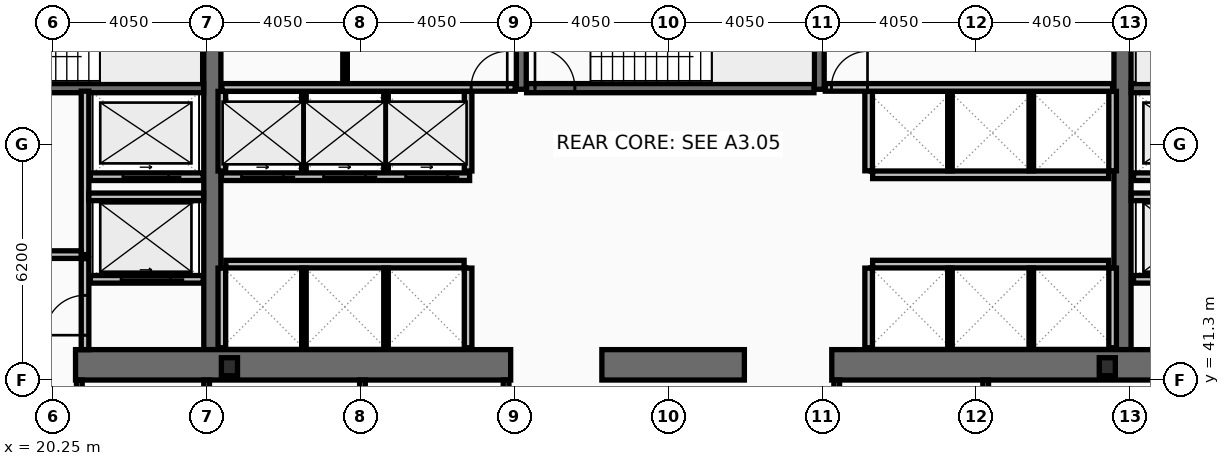
"""IFC4 building model, lengths in metres.
Left out: names, types, materials, properties, quantities, classifications, styles, units other than length and angle.
Written with IfcOpenShell. Run it as: python <this file> out.ifc"""

import sys

from ifc_helpers import new_model, si_unit, direction, frame, frame_2d, origin, origin_2d, place, context, subcontext, project, spatial, rectangle, i_section, extrude, element, fill, save


model = new_model("IFC4")
c1 = context("Model", 3, precision=1e-05, world=origin(), true_north=direction((0.0, 1.0)))
c2 = subcontext(c1, "Body", "Model", "MODEL_VIEW")
j1 = project(units=[si_unit("LENGTHUNIT", "METRE"), si_unit("PLANEANGLEUNIT", "RADIAN")], contexts=[c1])
p1 = place(None, origin())
s1 = spatial("IfcSite", under=j1, at=p1, CompositionType="ELEMENT")
p2 = place(p1, origin())
s2 = spatial("IfcBuilding", under=s1, at=p2, CompositionType="ELEMENT")
p3 = place(p2, frame((0.0, 0.0, 33.8)))
s3 = spatial("IfcBuildingStorey", under=s2, at=p3, CompositionType="ELEMENT", Elevation=33.8)
for number, where, z_axis, x_axis in (
    (1, (24.45, 42.1, 0.0), (0.0, 0.0, 1.0), (0.0, 1.0, 0.0)),
    (2, (48.4, 42.1, 0.0), (0.0, 0.0, 1.0), (0.0, 1.0, 0.0)),
):
    element("IfcWall", number, at=place(p3, frame(where, z_axis=z_axis, x_axis=x_axis)), inside=s3, PredefinedType="SHEAR", context=c2, shape_type="SweptSolid", body=[
        extrude(rectangle(XDim=10.8, YDim=0.45, at=frame_2d((5.4, 0.0))), origin(), (0.0, 0.0, 1.0), 3.82),
    ])
p4 = place(p3, frame((32.3, 41.7, 0.0), z_axis=(0.0, 0.0, 1.0), x_axis=(-1.0, 0.0, 0.0)))
e3 = element("IfcWall", 3, at=p4, inside=s3, PredefinedType="SHEAR", context=c2, shape_type="SweptSolid", body=[
    extrude(rectangle(XDim=11.45, YDim=0.8, at=frame_2d((5.725, 0.0))), origin(), (0.0, 0.0, 1.0), 3.82),
])
p5 = place(p3, frame((38.45, 41.7, 0.0), z_axis=(0.0, 0.0, 1.0), x_axis=(-1.0, 0.0, 0.0)))
e4 = element("IfcWall", 4, at=p5, inside=s3, PredefinedType="SHEAR", context=c2, shape_type="SweptSolid", body=[
    extrude(rectangle(XDim=3.75, YDim=0.8, at=frame_2d((1.875, 0.0))), origin(), (0.0, 0.0, 1.0), 3.82),
])
p6 = place(p3, frame((52.05, 41.7, 0.0), z_axis=(0.0, 0.0, 1.0), x_axis=(-1.0, 0.0, 0.0)))
e5 = element("IfcWall", 5, at=p6, inside=s3, PredefinedType="SHEAR", context=c2, shape_type="SweptSolid", body=[
    extrude(rectangle(XDim=11.3, YDim=0.8, at=frame_2d((5.65, 0.0))), origin(), (0.0, 0.0, 1.0), 3.82),
])
for number, where, z_axis, x_axis in (
    (6, (32.58, 48.95, 0.0), (0.0, 0.0, 1.0), (0.0, 1.0, 0.0)),
    (7, (40.42, 48.95, 0.0), (0.0, 0.0, 1.0), (0.0, 1.0, 0.0)),
):
    element("IfcWall", number, at=place(p3, frame(where, z_axis=z_axis, x_axis=x_axis)), inside=s3, PredefinedType="SHEAR", context=c2, shape_type="SweptSolid", body=[
        extrude(rectangle(XDim=3.95, YDim=0.26, at=frame_2d((1.975, 0.0))), origin(), (0.0, 0.0, 1.0), 3.82),
    ])
p7 = place(p3, frame((17.0, 48.98, 0.0), z_axis=(0.0, 0.0, 1.0), x_axis=(1.0, 0.0, 0.0)))
e8 = element("IfcWall", 8, at=p7, inside=s3, PredefinedType="SHEAR", context=c2, shape_type="SweptSolid", body=[
    extrude(rectangle(XDim=7.22, YDim=0.24, at=frame_2d((3.61, 0.0))), origin(), (0.0, 0.0, 1.0), 3.82),
])
p8 = place(p7, frame((0.22, 0.0, 0.0)))
e9 = element("IfcOpeningElement", 9, at=p8, cuts=e8, PredefinedType="OPENING", context=c2, shape_type="SweptSolid", body=[
    extrude(rectangle(XDim=1.05, YDim=2.15, at=frame_2d((0.525, 1.075))), frame((0.0, 0.13, 0.0), z_axis=(0.0, -1.0, 0.0), x_axis=(1.0, 0.0, 0.0)), (0.0, 0.0, 1.0), 0.26),
])
p9 = place(p3, frame((48.63, 48.98, 0.0), z_axis=(0.0, 0.0, 1.0), x_axis=(1.0, 0.0, 0.0)))
e10 = element("IfcWall", 10, at=p9, inside=s3, PredefinedType="SHEAR", context=c2, shape_type="SweptSolid", body=[
    extrude(rectangle(XDim=7.27, YDim=0.24, at=frame_2d((3.635, 0.0))), origin(), (0.0, 0.0, 1.0), 3.82),
])
p10 = place(p9, frame((6.0, 0.0, 0.0)))
e11 = element("IfcOpeningElement", 11, at=p10, cuts=e10, PredefinedType="OPENING", context=c2, shape_type="SweptSolid", body=[
    extrude(rectangle(XDim=1.05, YDim=2.15, at=frame_2d((0.525, 1.075))), frame((0.0, 0.13, 0.0), z_axis=(0.0, -1.0, 0.0), x_axis=(1.0, 0.0, 0.0)), (0.0, 0.0, 1.0), 0.26),
])
p11 = place(p3, frame((32.72, 48.98, 0.0), z_axis=(0.0, 0.0, 1.0), x_axis=(1.0, 0.0, 0.0)))
e12 = element("IfcWall", 12, at=p11, inside=s3, PredefinedType="SHEAR", context=c2, shape_type="SweptSolid", body=[
    extrude(rectangle(XDim=7.56, YDim=0.24, at=frame_2d((3.78, 0.0))), origin(), (0.0, 0.0, 1.0), 3.82),
])
p12 = place(p11, frame((0.22, 0.0, 0.0)))
e13 = element("IfcOpeningElement", 13, at=p12, cuts=e12, PredefinedType="OPENING", context=c2, shape_type="SweptSolid", body=[
    extrude(rectangle(XDim=1.05, YDim=2.15, at=frame_2d((0.525, 1.075))), frame((0.0, 0.13, 0.0), z_axis=(0.0, -1.0, 0.0), x_axis=(1.0, 0.0, 0.0)), (0.0, 0.0, 1.0), 0.26),
])
for number, where, z_axis, x_axis in (
    (14, (24.9, 41.65, 0.0), (0.0, 0.0, 1.0), (1.0, 0.0, 0.0)),
    (15, (48.0, 41.65, 0.0), (0.0, 0.0, 1.0), (1.0, 0.0, 0.0)),
):
    element("IfcColumn", number, at=place(p3, frame(where, z_axis=z_axis, x_axis=x_axis)), inside=s3, PredefinedType="COLUMN", context=c2, shape_type="SweptSolid", body=[
        extrude(i_section(OverallWidth=0.424, OverallDepth=0.474, WebThickness=0.048, FlangeThickness=0.077, at=origin_2d()), origin(), (0.0, 0.0, 1.0), 4.0),
    ])
p13 = place(p3, frame((51.61, 43.95, 0.0), z_axis=(0.0, 0.0, 1.0), x_axis=(-1.0, 0.0, 0.0)))
e16 = element("IfcWall", 16, at=p13, inside=s3, PredefinedType="PARTITIONING", context=c2, shape_type="SweptSolid", body=[
    extrude(rectangle(XDim=2.92, YDim=0.2, at=frame_2d((1.46, 0.0))), origin(), (0.0, 0.0, 1.0), 3.82),
])
p14 = place(p13, frame((0.81, 0.0, 0.0)))
e17 = element("IfcOpeningElement", 17, at=p14, cuts=e16, PredefinedType="OPENING", context=c2, shape_type="SweptSolid", body=[
    extrude(rectangle(XDim=1.3, YDim=2.18, at=frame_2d((0.65, 1.09))), frame((0.0, 0.11, 0.0), z_axis=(0.0, -1.0, 0.0), x_axis=(1.0, 0.0, 0.0)), (0.0, 0.0, 1.0), 0.22),
])
p15 = place(p3, frame((24.21, 43.95, 0.0), z_axis=(0.0, 0.0, 1.0), x_axis=(-1.0, 0.0, 0.0)))
e18 = element("IfcWall", 18, at=p15, inside=s3, PredefinedType="PARTITIONING", context=c2, shape_type="SweptSolid", body=[
    extrude(rectangle(XDim=2.97, YDim=0.2, at=frame_2d((1.485, 0.0))), origin(), (0.0, 0.0, 1.0), 3.82),
])
p16 = place(p15, frame((0.86, 0.0, 0.0)))
e19 = element("IfcOpeningElement", 19, at=p16, cuts=e18, PredefinedType="OPENING", context=c2, shape_type="SweptSolid", body=[
    extrude(rectangle(XDim=1.3, YDim=2.18, at=frame_2d((0.65, 1.09))), frame((0.0, 0.11, 0.0), z_axis=(0.0, -1.0, 0.0), x_axis=(1.0, 0.0, 0.0)), (0.0, 0.0, 1.0), 0.22),
])
p17 = place(p3, frame((51.61, 46.65, 0.0), z_axis=(0.0, 0.0, 1.0), x_axis=(-1.0, 0.0, 0.0)))
e20 = element("IfcWall", 20, at=p17, inside=s3, PredefinedType="PARTITIONING", context=c2, shape_type="SweptSolid", body=[
    extrude(rectangle(XDim=2.92, YDim=0.2, at=frame_2d((1.46, 0.0))), origin(), (0.0, 0.0, 1.0), 3.82),
])
p18 = place(p17, frame((0.86, 0.0, 0.0)))
e21 = element("IfcOpeningElement", 21, at=p18, cuts=e20, PredefinedType="OPENING", context=c2, shape_type="SweptSolid", body=[
    extrude(rectangle(XDim=1.2, YDim=2.18, at=frame_2d((0.6, 1.09))), frame((0.0, 0.11, 0.0), z_axis=(0.0, -1.0, 0.0), x_axis=(1.0, 0.0, 0.0)), (0.0, 0.0, 1.0), 0.22),
])
p19 = place(p3, frame((24.21, 46.65, 0.0), z_axis=(0.0, 0.0, 1.0), x_axis=(-1.0, 0.0, 0.0)))
e22 = element("IfcWall", 22, at=p19, inside=s3, PredefinedType="PARTITIONING", context=c2, shape_type="SweptSolid", body=[
    extrude(rectangle(XDim=2.97, YDim=0.2, at=frame_2d((1.485, 0.0))), origin(), (0.0, 0.0, 1.0), 3.82),
])
p20 = place(p19, frame((0.91, 0.0, 0.0)))
e23 = element("IfcOpeningElement", 23, at=p20, cuts=e22, PredefinedType="OPENING", context=c2, shape_type="SweptSolid", body=[
    extrude(rectangle(XDim=1.2, YDim=2.18, at=frame_2d((0.6, 1.09))), frame((0.0, 0.11, 0.0), z_axis=(0.0, -1.0, 0.0), x_axis=(1.0, 0.0, 0.0)), (0.0, 0.0, 1.0), 0.22),
])
p21 = place(p3, frame((31.22, 46.65, 0.0), z_axis=(0.0, 0.0, 1.0), x_axis=(-1.0, 0.0, 0.0)))
e24 = element("IfcWall", 24, at=p21, inside=s3, PredefinedType="PARTITIONING", context=c2, shape_type="SweptSolid", body=[
    extrude(rectangle(XDim=6.53, YDim=0.2, at=frame_2d((3.265, 0.0))), origin(), (0.0, 0.0, 1.0), 3.82),
])
p22 = place(p21, frame((4.9, 0.0, 0.0)))
e25 = element("IfcOpeningElement", 25, at=p22, cuts=e24, PredefinedType="OPENING", context=c2, shape_type="SweptSolid", body=[
    extrude(rectangle(XDim=1.1, YDim=2.18, at=frame_2d((0.55, 1.09))), frame((0.0, 0.11, 0.0), z_axis=(0.0, -1.0, 0.0), x_axis=(1.0, 0.0, 0.0)), (0.0, 0.0, 1.0), 0.22),
])
p23 = place(p21, frame((2.74, 0.0, 0.0)))
e26 = element("IfcOpeningElement", 26, at=p23, cuts=e24, PredefinedType="OPENING", context=c2, shape_type="SweptSolid", body=[
    extrude(rectangle(XDim=1.1, YDim=2.18, at=frame_2d((0.55, 1.09))), frame((0.0, 0.11, 0.0), z_axis=(0.0, -1.0, 0.0), x_axis=(1.0, 0.0, 0.0)), (0.0, 0.0, 1.0), 0.22),
])
p24 = place(p21, frame((0.58, 0.0, 0.0)))
e27 = element("IfcOpeningElement", 27, at=p24, cuts=e24, PredefinedType="OPENING", context=c2, shape_type="SweptSolid", body=[
    extrude(rectangle(XDim=1.1, YDim=2.18, at=frame_2d((0.55, 1.09))), frame((0.0, 0.11, 0.0), z_axis=(0.0, -1.0, 0.0), x_axis=(1.0, 0.0, 0.0)), (0.0, 0.0, 1.0), 0.22),
])
p25 = place(p3, frame((21.1, 44.6, 0.0), z_axis=(0.0, 0.0, 1.0), x_axis=(0.0, 1.0, 0.0)))
e28 = element("IfcWall", 28, at=p25, inside=s3, PredefinedType="PARTITIONING", context=c2, shape_type="SweptSolid", body=[
    extrude(rectangle(XDim=4.3, YDim=0.2, at=frame_2d((2.15, 0.0))), origin(), (0.0, 0.0, 1.0), 3.82),
])
p26 = place(p3, frame((17.0, 44.6, 0.0), z_axis=(0.0, 0.0, 1.0), x_axis=(1.0, 0.0, 0.0)))
e29 = element("IfcWall", 29, at=p26, inside=s3, PredefinedType="PARTITIONING", context=c2, shape_type="SweptSolid", body=[
    extrude(rectangle(XDim=4.0, YDim=0.2, at=frame_2d((2.0, 0.0))), origin(), (0.0, 0.0, 1.0), 3.82),
])
p27 = place(p26, frame((1.25, 0.0, 0.0)))
e30 = element("IfcOpeningElement", 30, at=p27, cuts=e29, PredefinedType="OPENING", context=c2, shape_type="SweptSolid", body=[
    extrude(rectangle(XDim=1.05, YDim=2.15, at=frame_2d((0.525, 1.075))), frame((0.0, 0.11, 0.0), z_axis=(0.0, -1.0, 0.0), x_axis=(1.0, 0.0, 0.0)), (0.0, 0.0, 1.0), 0.22),
])
p28 = place(p3, frame((21.2, 46.12, 0.0), z_axis=(0.0, 0.0, 1.0), x_axis=(1.0, 0.0, 0.0)))
e31 = element("IfcWall", 31, at=p28, inside=s3, PredefinedType="PARTITIONING", context=c2, shape_type="SweptSolid", body=[
    extrude(rectangle(XDim=3.02, YDim=0.2, at=frame_2d((1.51, 0.0))), origin(), (0.0, 0.0, 1.0), 3.82),
])
p29 = place(p3, frame((21.1, 42.1, 0.0), z_axis=(0.0, 0.0, 1.0), x_axis=(0.0, 1.0, 0.0)))
e32 = element("IfcWall", 32, at=p29, inside=s3, PredefinedType="PARTITIONING", context=c2, shape_type="SweptSolid", body=[
    extrude(rectangle(XDim=2.395, YDim=0.2, at=frame_2d((1.198, 0.0))), origin(), (0.0, 0.0, 1.0), 3.82),
])
p30 = place(p29, frame((0.38, 0.0, 0.0)))
e33 = element("IfcOpeningElement", 33, at=p30, cuts=e32, PredefinedType="OPENING", context=c2, shape_type="SweptSolid", body=[
    extrude(rectangle(XDim=1.05, YDim=2.15, at=frame_2d((0.525, 1.075))), frame((0.0, 0.11, 0.0), z_axis=(0.0, -1.0, 0.0), x_axis=(1.0, 0.0, 0.0)), (0.0, 0.0, 1.0), 0.22),
])
p31 = place(p3, frame((48.63, 46.12, 0.0), z_axis=(0.0, 0.0, 1.0), x_axis=(1.0, 0.0, 0.0)))
e34 = element("IfcWall", 34, at=p31, inside=s3, PredefinedType="PARTITIONING", context=c2, shape_type="SweptSolid", body=[
    extrude(rectangle(XDim=3.07, YDim=0.2, at=frame_2d((1.535, 0.0))), origin(), (0.0, 0.0, 1.0), 3.82),
])
for number, where, z_axis, x_axis in (
    (35, (24.7, 46.8, 0.0), (0.0, 0.0, 1.0), (0.0, 1.0, 0.0)),
    (36, (31.18, 46.8, 0.0), (0.0, 0.0, 1.0), (0.0, 1.0, 0.0)),
):
    element("IfcWall", number, at=place(p3, frame(where, z_axis=z_axis, x_axis=x_axis)), inside=s3, PredefinedType="PARTITIONING", context=c2, shape_type="SweptSolid", body=[
        extrude(rectangle(XDim=2.095, YDim=0.2, at=frame_2d((1.047, 0.0))), origin(), (0.0, 0.0, 1.0), 3.82),
    ])
for number, where, z_axis, x_axis in (
    (37, (26.86, 46.8, 0.0), (0.0, 0.0, 1.0), (0.0, 1.0, 0.0)),
    (38, (29.02, 46.8, 0.0), (0.0, 0.0, 1.0), (0.0, 1.0, 0.0)),
):
    element("IfcWall", number, at=place(p3, frame(where, z_axis=z_axis, x_axis=x_axis)), inside=s3, PredefinedType="PARTITIONING", context=c2, shape_type="SweptSolid", body=[
        extrude(rectangle(XDim=2.095, YDim=0.12, at=frame_2d((1.047, 0.0))), origin(), (0.0, 0.0, 1.0), 3.82),
    ])
p32 = place(p3, frame((24.805, 44.35, 0.0), z_axis=(0.0, 0.0, 1.0), x_axis=(1.0, 0.0, 0.0)))
e39 = element("IfcWall", 39, at=p32, inside=s3, PredefinedType="PARTITIONING", context=c2, shape_type="SweptSolid", body=[
    extrude(rectangle(XDim=6.27, YDim=0.2, at=frame_2d((3.135, 0.0))), origin(), (0.0, 0.0, 1.0), 3.82),
])
for number, where, z_axis, x_axis in (
    (40, (24.7, 42.15, 0.0), (0.0, 0.0, 1.0), (0.0, 1.0, 0.0)),
    (41, (31.18, 42.15, 0.0), (0.0, 0.0, 1.0), (0.0, 1.0, 0.0)),
):
    element("IfcWall", number, at=place(p3, frame(where, z_axis=z_axis, x_axis=x_axis)), inside=s3, PredefinedType="PARTITIONING", context=c2, shape_type="SweptSolid", body=[
        extrude(rectangle(XDim=2.095, YDim=0.2, at=frame_2d((1.048, 0.0))), origin(), (0.0, 0.0, 1.0), 3.82),
    ])
for number, where, z_axis, x_axis in (
    (42, (26.86, 42.15, 0.0), (0.0, 0.0, 1.0), (0.0, 1.0, 0.0)),
    (43, (29.02, 42.15, 0.0), (0.0, 0.0, 1.0), (0.0, 1.0, 0.0)),
):
    element("IfcWall", number, at=place(p3, frame(where, z_axis=z_axis, x_axis=x_axis)), inside=s3, PredefinedType="PARTITIONING", context=c2, shape_type="SweptSolid", body=[
        extrude(rectangle(XDim=2.095, YDim=0.12, at=frame_2d((1.048, 0.0))), origin(), (0.0, 0.0, 1.0), 3.82),
    ])
p33 = place(p3, frame((41.825, 46.7, 0.0), z_axis=(0.0, 0.0, 1.0), x_axis=(1.0, 0.0, 0.0)))
e44 = element("IfcWall", 44, at=p33, inside=s3, PredefinedType="PARTITIONING", context=c2, shape_type="SweptSolid", body=[
    extrude(rectangle(XDim=6.21, YDim=0.2, at=frame_2d((3.105, 0.0))), origin(), (0.0, 0.0, 1.0), 3.82),
])
for number, where, z_axis, x_axis in (
    (45, (41.72, 46.805, 0.0), (0.0, 0.0, 1.0), (0.0, 1.0, 0.0)),
    (46, (48.14, 46.805, 0.0), (0.0, 0.0, 1.0), (0.0, 1.0, 0.0)),
):
    element("IfcWall", number, at=place(p3, frame(where, z_axis=z_axis, x_axis=x_axis)), inside=s3, PredefinedType="PARTITIONING", context=c2, shape_type="SweptSolid", body=[
        extrude(rectangle(XDim=2.09, YDim=0.2, at=frame_2d((1.045, 0.0))), origin(), (0.0, 0.0, 1.0), 3.82),
    ])
for number, where, z_axis, x_axis in (
    (47, (43.86, 46.805, 0.0), (0.0, 0.0, 1.0), (0.0, 1.0, 0.0)),
    (48, (46.0, 46.805, 0.0), (0.0, 0.0, 1.0), (0.0, 1.0, 0.0)),
):
    element("IfcWall", number, at=place(p3, frame(where, z_axis=z_axis, x_axis=x_axis)), inside=s3, PredefinedType="PARTITIONING", context=c2, shape_type="SweptSolid", body=[
        extrude(rectangle(XDim=2.09, YDim=0.12, at=frame_2d((1.045, 0.0))), origin(), (0.0, 0.0, 1.0), 3.82),
    ])
p34 = place(p3, frame((41.825, 44.35, 0.0), z_axis=(0.0, 0.0, 1.0), x_axis=(1.0, 0.0, 0.0)))
e49 = element("IfcWall", 49, at=p34, inside=s3, PredefinedType="PARTITIONING", context=c2, shape_type="SweptSolid", body=[
    extrude(rectangle(XDim=6.21, YDim=0.2, at=frame_2d((3.105, 0.0))), origin(), (0.0, 0.0, 1.0), 3.82),
])
for number, where, z_axis, x_axis in (
    (50, (41.72, 42.15, 0.0), (0.0, 0.0, 1.0), (0.0, 1.0, 0.0)),
    (51, (48.14, 42.15, 0.0), (0.0, 0.0, 1.0), (0.0, 1.0, 0.0)),
):
    element("IfcWall", number, at=place(p3, frame(where, z_axis=z_axis, x_axis=x_axis)), inside=s3, PredefinedType="PARTITIONING", context=c2, shape_type="SweptSolid", body=[
        extrude(rectangle(XDim=2.095, YDim=0.2, at=frame_2d((1.048, 0.0))), origin(), (0.0, 0.0, 1.0), 3.82),
    ])
for number, where, z_axis, x_axis in (
    (52, (43.86, 42.15, 0.0), (0.0, 0.0, 1.0), (0.0, 1.0, 0.0)),
    (53, (46.0, 42.15, 0.0), (0.0, 0.0, 1.0), (0.0, 1.0, 0.0)),
):
    element("IfcWall", number, at=place(p3, frame(where, z_axis=z_axis, x_axis=x_axis)), inside=s3, PredefinedType="PARTITIONING", context=c2, shape_type="SweptSolid", body=[
        extrude(rectangle(XDim=2.095, YDim=0.12, at=frame_2d((1.048, 0.0))), origin(), (0.0, 0.0, 1.0), 3.82),
    ])
p35 = place(p3, frame((24.7, 49.0, 0.0), z_axis=(0.0, 0.0, 1.0), x_axis=(1.0, 0.0, 0.0)))
e54 = element("IfcWall", 54, at=p35, inside=s3, PredefinedType="PARTITIONING", context=c2, shape_type="SweptSolid", body=[
    extrude(rectangle(XDim=7.72, YDim=0.2, at=frame_2d((3.86, 0.0))), origin(), (0.0, 0.0, 1.0), 3.82),
])
p36 = place(p35, frame((6.56, 0.0, 0.0)))
e55 = element("IfcOpeningElement", 55, at=p36, cuts=e54, PredefinedType="OPENING", context=c2, shape_type="SweptSolid", body=[
    extrude(rectangle(XDim=0.95, YDim=2.1, at=frame_2d((0.475, 1.05))), frame((0.0, 0.11, 0.0), z_axis=(0.0, -1.0, 0.0), x_axis=(1.0, 0.0, 0.0)), (0.0, 0.0, 1.0), 0.22),
])
p37 = place(p3, frame((27.942, 49.105, 0.0), z_axis=(0.0, 0.0, 1.0), x_axis=(0.0, 1.0, 0.0)))
e56 = element("IfcWall", 56, at=p37, inside=s3, PredefinedType="PARTITIONING", context=c2, shape_type="SweptSolid", body=[
    extrude(rectangle(XDim=3.69, YDim=0.12, at=frame_2d((1.845, 0.0))), origin(), (0.0, 0.0, 1.0), 3.82),
])
p38 = place(p37, frame((1.05, 0.0, 0.0)))
e57 = element("IfcOpeningElement", 57, at=p38, cuts=e56, PredefinedType="OPENING", context=c2, shape_type="SweptSolid", body=[
    extrude(rectangle(XDim=0.9, YDim=2.05, at=frame_2d((0.45, 1.025))), frame((0.0, 0.07, 0.0), z_axis=(0.0, -1.0, 0.0), x_axis=(1.0, 0.0, 0.0)), (0.0, 0.0, 1.0), 0.14),
])
p39 = place(p3, frame((40.58, 49.0, 0.0), z_axis=(0.0, 0.0, 1.0), x_axis=(1.0, 0.0, 0.0)))
e58 = element("IfcWall", 58, at=p39, inside=s3, PredefinedType="PARTITIONING", context=c2, shape_type="SweptSolid", body=[
    extrude(rectangle(XDim=7.56, YDim=0.2, at=frame_2d((3.78, 0.0))), origin(), (0.0, 0.0, 1.0), 3.82),
])
p40 = place(p39, frame((0.16, 0.0, 0.0)))
e59 = element("IfcOpeningElement", 59, at=p40, cuts=e58, PredefinedType="OPENING", context=c2, shape_type="SweptSolid", body=[
    extrude(rectangle(XDim=0.95, YDim=2.1, at=frame_2d((0.475, 1.05))), frame((0.0, 0.11, 0.0), z_axis=(0.0, -1.0, 0.0), x_axis=(1.0, 0.0, 0.0)), (0.0, 0.0, 1.0), 0.22),
])
for number, where, z_axis, x_axis in (
    (60, (20.95, 38.28, 0.0), (0.0, 0.0, 1.0), (0.0, 1.0, 0.0)),
    (61, (24.3, 38.28, 0.0), (0.0, 0.0, 1.0), (0.0, 1.0, 0.0)),
    (62, (28.4, 38.28, 0.0), (0.0, 0.0, 1.0), (0.0, 1.0, 0.0)),
    (63, (32.18, 38.28, 0.0), (0.0, 0.0, 1.0), (0.0, 1.0, 0.0)),
    (64, (40.88, 38.28, 0.0), (0.0, 0.0, 1.0), (0.0, 1.0, 0.0)),
    (65, (44.8, 38.28, 0.0), (0.0, 0.0, 1.0), (0.0, 1.0, 0.0)),
):
    element("IfcWall", number, at=place(p3, frame(where, z_axis=z_axis, x_axis=x_axis)), inside=s3, PredefinedType="PARTITIONING", context=c2, shape_type="SweptSolid", body=[
        extrude(rectangle(XDim=3.02, YDim=0.15, at=frame_2d((1.51, 0.0))), origin(), (0.0, 0.0, 1.0), 3.82),
    ])
p41 = place(p12, origin())
e66 = element("IfcDoor", 66, at=p41, inside=s3, OperationType="SINGLE_SWING_LEFT", PredefinedType="DOOR", context=c2, shape_type="SweptSolid", body=[
    extrude(rectangle(XDim=1.05, YDim=2.15, at=frame_2d((0.525, 1.075))), frame((0.0, 0.025, 0.0), z_axis=(0.0, -1.0, 0.0), x_axis=(1.0, 0.0, 0.0)), (0.0, 0.0, 1.0), 0.05),
])
fill(e13, e66)
p42 = place(p16, origin())
e67 = element("IfcDoor", 67, at=p42, inside=s3, OperationType="SLIDING_TO_LEFT", PredefinedType="DOOR", context=c2, shape_type="SweptSolid", body=[
    extrude(rectangle(XDim=1.3, YDim=2.18, at=frame_2d((0.65, 1.09))), frame((0.0, 0.025, 0.0), z_axis=(0.0, -1.0, 0.0), x_axis=(1.0, 0.0, 0.0)), (0.0, 0.0, 1.0), 0.05),
])
fill(e19, e67)
p43 = place(p20, origin())
e68 = element("IfcDoor", 68, at=p43, inside=s3, OperationType="SLIDING_TO_LEFT", PredefinedType="DOOR", context=c2, shape_type="SweptSolid", body=[
    extrude(rectangle(XDim=1.2, YDim=2.18, at=frame_2d((0.6, 1.09))), frame((0.0, 0.025, 0.0), z_axis=(0.0, -1.0, 0.0), x_axis=(1.0, 0.0, 0.0)), (0.0, 0.0, 1.0), 0.05),
])
fill(e23, e68)
p44 = place(p22, origin())
e69 = element("IfcDoor", 69, at=p44, inside=s3, OperationType="SLIDING_TO_LEFT", PredefinedType="DOOR", context=c2, shape_type="SweptSolid", body=[
    extrude(rectangle(XDim=1.1, YDim=2.18, at=frame_2d((0.55, 1.09))), frame((0.0, 0.025, 0.0), z_axis=(0.0, -1.0, 0.0), x_axis=(1.0, 0.0, 0.0)), (0.0, 0.0, 1.0), 0.05),
])
fill(e25, e69)
p45 = place(p23, origin())
e70 = element("IfcDoor", 70, at=p45, inside=s3, OperationType="SLIDING_TO_LEFT", PredefinedType="DOOR", context=c2, shape_type="SweptSolid", body=[
    extrude(rectangle(XDim=1.1, YDim=2.18, at=frame_2d((0.55, 1.09))), frame((0.0, 0.025, 0.0), z_axis=(0.0, -1.0, 0.0), x_axis=(1.0, 0.0, 0.0)), (0.0, 0.0, 1.0), 0.05),
])
fill(e26, e70)
p46 = place(p24, origin())
e71 = element("IfcDoor", 71, at=p46, inside=s3, OperationType="SLIDING_TO_LEFT", PredefinedType="DOOR", context=c2, shape_type="SweptSolid", body=[
    extrude(rectangle(XDim=1.1, YDim=2.18, at=frame_2d((0.55, 1.09))), frame((0.0, 0.025, 0.0), z_axis=(0.0, -1.0, 0.0), x_axis=(1.0, 0.0, 0.0)), (0.0, 0.0, 1.0), 0.05),
])
fill(e27, e71)
p47 = place(p30, origin())
e72 = element("IfcDoor", 72, at=p47, inside=s3, OperationType="SINGLE_SWING_LEFT", PredefinedType="DOOR", context=c2, shape_type="SweptSolid", body=[
    extrude(rectangle(XDim=1.05, YDim=2.15, at=frame_2d((0.525, 1.075))), frame((0.0, 0.025, 0.0), z_axis=(0.0, -1.0, 0.0), x_axis=(1.0, 0.0, 0.0)), (0.0, 0.0, 1.0), 0.05),
])
fill(e33, e72)
p48 = place(p36, origin())
e73 = element("IfcDoor", 73, at=p48, inside=s3, OperationType="SINGLE_SWING_RIGHT", PredefinedType="DOOR", context=c2, shape_type="SweptSolid", body=[
    extrude(rectangle(XDim=0.95, YDim=2.1, at=frame_2d((0.475, 1.05))), frame((0.0, 0.025, 0.0), z_axis=(0.0, -1.0, 0.0), x_axis=(1.0, 0.0, 0.0)), (0.0, 0.0, 1.0), 0.05),
])
fill(e55, e73)
p49 = place(p40, origin())
e74 = element("IfcDoor", 74, at=p49, inside=s3, OperationType="SINGLE_SWING_RIGHT", PredefinedType="DOOR", context=c2, shape_type="SweptSolid", body=[
    extrude(rectangle(XDim=0.95, YDim=2.1, at=frame_2d((0.475, 1.05))), frame((0.0, 0.025, 0.0), z_axis=(0.0, -1.0, 0.0), x_axis=(1.0, 0.0, 0.0)), (0.0, 0.0, 1.0), 0.05),
])
fill(e59, e74)
save(model, sys.argv[1])
